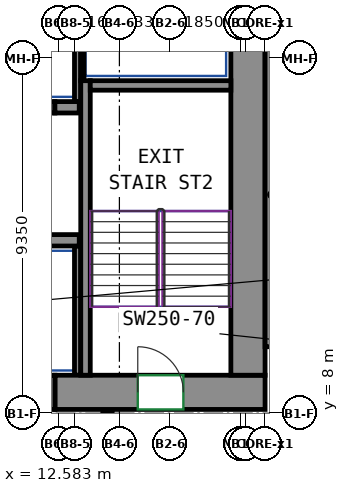
"""IFC4 building model, lengths in metres.
Left out: names, types, materials, properties, quantities, classifications, styles, units other than length and angle.
Written with IfcOpenShell. Run it as: python <this file> out.ifc"""

import sys

from ifc_helpers import new_model, si_unit, direction, frame, frame_2d, origin, place, context, subcontext, project, spatial, rectangle, extrude, source, transform, mapped, element, fill, save


model = new_model("IFC4")
c1 = context("Model", 3, precision=1e-05, world=origin(), true_north=direction((0.0, 1.0)))
c2 = subcontext(c1, "Body", "Model", "MODEL_VIEW")
j1 = project(units=[si_unit("LENGTHUNIT", "METRE"), si_unit("PLANEANGLEUNIT", "RADIAN")], contexts=[c1])
p1 = place(None, origin())
s1 = spatial("IfcSite", under=j1, at=p1, CompositionType="ELEMENT")
p2 = place(p1, origin())
s2 = spatial("IfcBuilding", under=s1, at=p2, CompositionType="ELEMENT")
p3 = place(p2, frame((0.0, 0.0, 160.9)))
s3 = spatial("IfcBuildingStorey", under=s2, at=p3, CompositionType="ELEMENT", Elevation=160.9)
m1 = source(origin(), c2, "Body", "SweptSolid", [
    extrude(rectangle(XDim=5.53, YDim=0.9, at=frame_2d((2.765, 0.0))), origin(), (0.0, 0.0, 1.0), 3.0),
])
p4 = place(p3, frame((12.47, 8.55, 0.0), z_axis=(0.0, 0.0, 1.0), x_axis=(1.0, 0.0, 0.0)))
e1 = element("IfcWall", 1, at=p4, inside=s3, PredefinedType="SHEAR", context=c2, shape_type="MappedRepresentation", body=[
    mapped(m1, transform((0.0, 0.0, 0.0))),
])
p5 = place(p4, frame((2.18, 0.0, 0.0)))
e2 = element("IfcOpeningElement", 2, at=p5, cuts=e1, PredefinedType="OPENING", context=c2, shape_type="SweptSolid", body=[
    extrude(rectangle(XDim=1.2, YDim=2.1, at=frame_2d((0.6, 1.05))), frame((0.0, 0.46, 0.0), z_axis=(0.0, -1.0, 0.0), x_axis=(1.0, 0.0, 0.0)), (0.0, 0.0, 1.0), 0.92),
])
m2 = source(origin(), c2, "Body", "SweptSolid", [
    extrude(rectangle(XDim=12.0, YDim=0.9, at=frame_2d((6.0, 0.0))), origin(), (0.0, 0.0, 1.0), 3.0),
])
p6 = place(p3, frame((17.55, 9.0, 0.0), z_axis=(0.0, 0.0, 1.0), x_axis=(0.0, 1.0, 0.0)))
e3 = element("IfcWall", 3, at=p6, inside=s3, PredefinedType="SHEAR", context=c2, shape_type="MappedRepresentation", body=[
    mapped(m2, transform((0.0, 0.0, 0.0))),
])
m3 = source(origin(), c2, "Body", "SweptSolid", [
    extrude(rectangle(XDim=7.75, YDim=0.25, at=frame_2d((3.875, 0.0))), origin(), (0.0, 0.0, 1.0), 3.0),
])
p7 = place(p3, frame((13.275, 9.0, 0.0), z_axis=(0.0, 0.0, 1.0), x_axis=(0.0, 1.0, 0.0)))
e4 = element("IfcWall", 4, at=p7, inside=s3, PredefinedType="SHEAR", context=c2, shape_type="MappedRepresentation", body=[
    mapped(m3, transform((0.0, 0.0, 0.0))),
])
m4 = source(origin(), c2, "Body", "SweptSolid", [
    extrude(rectangle(XDim=3.7, YDim=0.25, at=frame_2d((1.85, 0.0))), origin(), (0.0, 0.0, 1.0), 3.0),
])
p8 = place(p3, frame((13.4, 16.625, 0.0), z_axis=(0.0, 0.0, 1.0), x_axis=(1.0, 0.0, 0.0)))
e5 = element("IfcWall", 5, at=p8, inside=s3, PredefinedType="SHEAR", context=c2, shape_type="MappedRepresentation", body=[
    mapped(m4, transform((0.0, 0.0, 0.0))),
])
m5 = source(origin(), c2, "Body", "SweptSolid", [
    extrude(rectangle(XDim=8.0, YDim=0.35, at=frame_2d((4.0, 0.0))), origin(), (0.0, 0.0, 1.0), 3.0),
])
p9 = place(p3, frame((18.175, 9.75, 0.0), z_axis=(0.0, 0.0, 1.0), x_axis=(0.0, 1.0, 0.0)))
e6 = element("IfcWall", 6, at=p9, inside=s3, PredefinedType="SHEAR", context=c2, shape_type="MappedRepresentation", body=[
    mapped(m5, transform((0.0, 0.0, 0.0))),
])
m6 = source(origin(), c2, "Body", "SweptSolid", [
    extrude(rectangle(XDim=2.82, YDim=0.3, at=frame_2d((1.41, 0.0))), origin(), (0.0, 0.0, 1.0), 3.0),
])
p10 = place(p3, frame((10.29, 12.55, 0.0), z_axis=(0.0, 0.0, 1.0), x_axis=(1.0, 0.0, 0.0)))
e7 = element("IfcWall", 7, at=p10, inside=s3, PredefinedType="SHEAR", context=c2, shape_type="MappedRepresentation", body=[
    mapped(m6, transform((0.0, 0.0, 0.0))),
])
m7 = source(origin(), c2, "Body", "SweptSolid", [
    extrude(rectangle(XDim=0.64, YDim=0.3, at=frame_2d((0.32, 0.0))), origin(), (0.0, 0.0, 1.0), 3.0),
])
p11 = place(p3, frame((12.47, 16.05, 0.0), z_axis=(0.0, 0.0, 1.0), x_axis=(1.0, 0.0, 0.0)))
e8 = element("IfcWall", 8, at=p11, inside=s3, PredefinedType="SHEAR", context=c2, shape_type="MappedRepresentation", body=[
    mapped(m7, transform((0.0, 0.0, 0.0))),
])
m8 = source(origin(), c2, "Body", "SweptSolid", [
    extrude(rectangle(XDim=1.4, YDim=0.3, at=frame_2d((0.7, 0.0))), origin(), (0.0, 0.0, 1.0), 3.0),
])
p12 = place(p3, frame((11.07, 16.05, 0.0), z_axis=(0.0, 0.0, 1.0), x_axis=(1.0, 0.0, 0.0)))
e9 = element("IfcWall", 9, at=p12, inside=s3, PredefinedType="PARTITIONING", context=c2, shape_type="MappedRepresentation", body=[
    mapped(m8, transform((0.0, 0.0, 0.0))),
])
p13 = place(p12, frame((0.15, 0.0, 0.0)))
e10 = element("IfcOpeningElement", 10, at=p13, cuts=e9, PredefinedType="OPENING", context=c2, shape_type="SweptSolid", body=[
    extrude(rectangle(XDim=1.1, YDim=2.1, at=frame_2d((0.55, 1.05))), frame((0.0, 0.16, 0.0), z_axis=(0.0, -1.0, 0.0), x_axis=(1.0, 0.0, 0.0)), (0.0, 0.0, 1.0), 0.32),
])
m9 = source(origin(), c2, "Body", "SweptSolid", [
    extrude(rectangle(XDim=3.275, YDim=0.165, at=frame_2d((1.638, 0.0))), origin(), (0.0, 0.0, 1.0), 3.0),
])
p14 = place(p3, frame((13.067, 16.2, 0.0), z_axis=(0.0, 0.0, 1.0), x_axis=(0.0, 1.0, 0.0)))
e11 = element("IfcWall", 11, at=p14, inside=s3, PredefinedType="PARTITIONING", context=c2, shape_type="MappedRepresentation", body=[
    mapped(m9, transform((0.0, 0.0, 0.0))),
])
m10 = source(origin(), c2, "Body", "SweptSolid", [
    extrude(rectangle(XDim=2.725, YDim=0.085, at=frame_2d((1.363, 0.0))), origin(), (0.0, 0.0, 1.0), 3.0),
])
p15 = place(p3, frame((13.192, 16.75, 0.0), z_axis=(0.0, 0.0, 1.0), x_axis=(0.0, 1.0, 0.0)))
e12 = element("IfcWall", 12, at=p15, inside=s3, PredefinedType="PARTITIONING", context=c2, shape_type="MappedRepresentation", body=[
    mapped(m10, transform((0.0, 0.0, 0.0))),
])
m11 = source(origin(), c2, "Body", "SweptSolid", [
    extrude(rectangle(XDim=3.4, YDim=0.165, at=frame_2d((1.7, 0.0))), origin(), (0.0, 0.0, 1.0), 3.0),
])
p16 = place(p3, frame((13.067, 9.0, 0.0), z_axis=(0.0, 0.0, 1.0), x_axis=(0.0, 1.0, 0.0)))
e13 = element("IfcWall", 13, at=p16, inside=s3, PredefinedType="PARTITIONING", context=c2, shape_type="MappedRepresentation", body=[
    mapped(m11, transform((0.0, 0.0, 0.0))),
])
m12 = source(origin(), c2, "Body", "SweptSolid", [
    extrude(rectangle(XDim=1.4, YDim=0.9, at=frame_2d((0.7, 0.0))), origin(), (0.0, 0.0, 1.0), 2.7),
])
p17 = place(p3, frame((11.07, 8.55, 0.0), z_axis=(0.0, 0.0, 1.0), x_axis=(1.0, 0.0, 0.0)))
e14 = element("IfcWall", 14, at=p17, inside=s3, PredefinedType="PARTITIONING", context=c2, shape_type="MappedRepresentation", body=[
    mapped(m12, transform((0.0, 0.0, 0.0))),
])
p18 = place(p17, frame((0.25, 0.0, 0.0)))
e15 = element("IfcOpeningElement", 15, at=p18, cuts=e14, PredefinedType="OPENING", context=c2, shape_type="SweptSolid", body=[
    extrude(rectangle(XDim=0.9, YDim=2.1, at=frame_2d((0.45, 1.05))), frame((0.0, 0.46, 0.0), z_axis=(0.0, -1.0, 0.0), x_axis=(1.0, 0.0, 0.0)), (0.0, 0.0, 1.0), 0.92),
])
p19 = place(p5, origin())
e16 = element("IfcDoor", 16, at=p19, inside=s3, OperationType="DOUBLE_DOOR_SINGLE_SWING", PredefinedType="DOOR", context=c2, shape_type="SweptSolid", body=[
    extrude(rectangle(XDim=1.2, YDim=2.1, at=frame_2d((0.6, 1.05))), frame((0.0, 0.355, 0.0), z_axis=(0.0, -1.0, 0.0), x_axis=(1.0, 0.0, 0.0)), (0.0, 0.0, 1.0), 0.05),
])
fill(e2, e16)
save(model, sys.argv[1])
